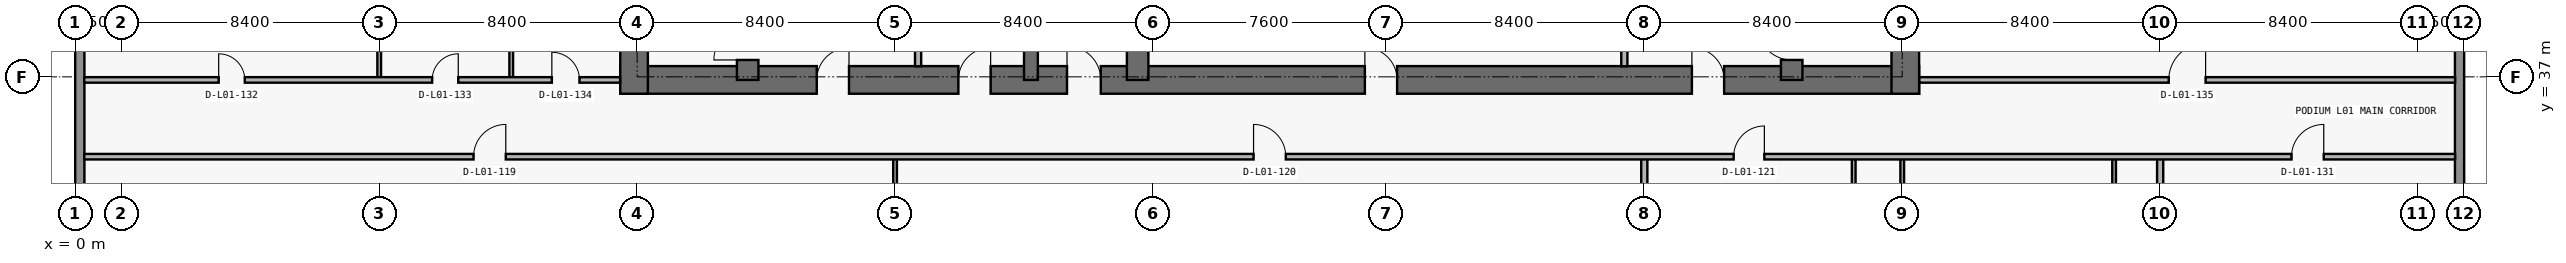
"""IFC4 building model, lengths in metres.
Left out: names, types, materials, properties, quantities, classifications, styles, units other than length and angle.
Written with IfcOpenShell. Run it as: python <this file> out.ifc"""

import sys

from ifc_helpers import new_model, si_unit, direction, frame, frame_2d, origin, place, context, subcontext, project, spatial, rectangle, extrude, element, fill, save


model = new_model("IFC4")
c1 = context("Model", 3, precision=1e-05, world=origin(), true_north=direction((0.0, 1.0)))
c2 = subcontext(c1, "Body", "Model", "MODEL_VIEW")
j1 = project(units=[si_unit("LENGTHUNIT", "METRE"), si_unit("PLANEANGLEUNIT", "RADIAN")], contexts=[c1])
p1 = place(None, origin())
s1 = spatial("IfcSite", under=j1, at=p1, CompositionType="ELEMENT")
p2 = place(p1, origin())
s2 = spatial("IfcBuilding", under=s1, at=p2, CompositionType="ELEMENT")
p3 = place(p2, frame((0.0, 0.0, 5.4)))
s3 = spatial("IfcBuildingStorey", under=s2, at=p3, CompositionType="ELEMENT", Elevation=5.4)
p4 = place(p3, frame((17.75, 36.9, 0.0), z_axis=(0.0, 0.0, 1.0), x_axis=(1.0, 0.0, 0.0)))
e1 = element("IfcWall", 1, at=p4, inside=s3, PredefinedType="SHEAR", context=c2, shape_type="SweptSolid", body=[
    extrude(rectangle(XDim=42.3, YDim=0.9, at=frame_2d((21.15, 0.0))), origin(), (0.0, 0.0, 1.0), 4.5),
])
p5 = place(p4, frame((14.55, 0.0, 0.0)))
e2 = element("IfcOpeningElement", 2, at=p5, cuts=e1, PredefinedType="OPENING", context=c2, shape_type="SweptSolid", body=[
    extrude(rectangle(XDim=1.1, YDim=2.15, at=frame_2d((0.55, 1.075))), frame((0.0, 0.46, 0.0), z_axis=(0.0, -1.0, 0.0), x_axis=(1.0, 0.0, 0.0)), (0.0, 0.0, 1.0), 0.92),
])
p6 = place(p4, frame((6.4, 0.0, 0.0)))
e3 = element("IfcOpeningElement", 3, at=p6, cuts=e1, PredefinedType="OPENING", context=c2, shape_type="SweptSolid", body=[
    extrude(rectangle(XDim=1.05, YDim=2.15, at=frame_2d((0.525, 1.075))), frame((0.0, 0.46, 0.0), z_axis=(0.0, -1.0, 0.0), x_axis=(1.0, 0.0, 0.0)), (0.0, 0.0, 1.0), 0.92),
])
p7 = place(p4, frame((34.9, 0.0, 0.0)))
e4 = element("IfcOpeningElement", 4, at=p7, cuts=e1, PredefinedType="OPENING", context=c2, shape_type="SweptSolid", body=[
    extrude(rectangle(XDim=1.05, YDim=2.15, at=frame_2d((0.525, 1.075))), frame((0.0, 0.46, 0.0), z_axis=(0.0, -1.0, 0.0), x_axis=(1.0, 0.0, 0.0)), (0.0, 0.0, 1.0), 0.92),
])
p8 = place(p4, frame((11.012, 0.0, 0.0)))
e5 = element("IfcOpeningElement", 5, at=p8, cuts=e1, PredefinedType="OPENING", context=c2, shape_type="SweptSolid", body=[
    extrude(rectangle(XDim=1.05, YDim=2.15, at=frame_2d((0.525, 1.075))), frame((0.0, 0.46, 0.0), z_axis=(0.0, -1.0, 0.0), x_axis=(1.0, 0.0, 0.0)), (0.0, 0.0, 1.0), 0.92),
])
p9 = place(p4, frame((24.25, 0.0, 0.0)))
e6 = element("IfcOpeningElement", 6, at=p9, cuts=e1, PredefinedType="OPENING", context=c2, shape_type="SweptSolid", body=[
    extrude(rectangle(XDim=1.05, YDim=2.15, at=frame_2d((0.525, 1.075))), frame((0.0, 0.46, 0.0), z_axis=(0.0, -1.0, 0.0), x_axis=(1.0, 0.0, 0.0)), (0.0, 0.0, 1.0), 0.92),
])
for number, where, z_axis, x_axis in (
    (7, (18.2, 36.45, 0.0), (0.0, 0.0, 1.0), (0.0, 1.0, 0.0)),
    (8, (59.6, 36.45, 0.0), (0.0, 0.0, 1.0), (0.0, 1.0, 0.0)),
):
    element("IfcWall", number, at=place(p3, frame(where, z_axis=z_axis, x_axis=x_axis)), inside=s3, PredefinedType="SHEAR", context=c2, shape_type="SweptSolid", body=[
        extrude(rectangle(XDim=14.15, YDim=0.9, at=frame_2d((7.075, 0.0))), origin(), (0.0, 0.0, 1.0), 4.5),
    ])
p10 = place(p3, frame((21.9, 36.9, 0.0), z_axis=(0.0, 0.0, 1.0), x_axis=(0.0, 1.0, 0.0)))
e9 = element("IfcWall", 9, at=p10, inside=s3, PredefinedType="SHEAR", context=c2, shape_type="SweptSolid", body=[
    extrude(rectangle(XDim=9.675, YDim=0.7, at=frame_2d((4.837, 0.0))), origin(), (0.0, 0.0, 1.0), 4.5),
])
p11 = place(p10, frame((0.65, 0.0, 0.0)))
e10 = element("IfcOpeningElement", 10, at=p11, cuts=e9, PredefinedType="OPENING", context=c2, shape_type="SweptSolid", body=[
    extrude(rectangle(XDim=1.1, YDim=2.15, at=frame_2d((0.55, 1.075))), frame((0.0, 0.36, 0.0), z_axis=(0.0, -1.0, 0.0), x_axis=(1.0, 0.0, 0.0)), (0.0, 0.0, 1.0), 0.72),
])
p12 = place(p3, frame((55.9, 36.9, 0.0), z_axis=(0.0, 0.0, 1.0), x_axis=(0.0, 1.0, 0.0)))
e11 = element("IfcWall", 11, at=p12, inside=s3, PredefinedType="SHEAR", context=c2, shape_type="SweptSolid", body=[
    extrude(rectangle(XDim=9.675, YDim=0.7, at=frame_2d((4.837, 0.0))), origin(), (0.0, 0.0, 1.0), 4.5),
])
p13 = place(p12, frame((0.65, 0.0, 0.0)))
e12 = element("IfcOpeningElement", 12, at=p13, cuts=e11, PredefinedType="OPENING", context=c2, shape_type="SweptSolid", body=[
    extrude(rectangle(XDim=1.1, YDim=2.15, at=frame_2d((0.55, 1.075))), frame((0.0, 0.36, 0.0), z_axis=(0.0, -1.0, 0.0), x_axis=(1.0, 0.0, 0.0)), (0.0, 0.0, 1.0), 0.72),
])
p14 = place(p3, frame((31.125, 36.9, 0.0), z_axis=(0.0, 0.0, 1.0), x_axis=(0.0, 1.0, 0.0)))
e13 = element("IfcWall", 13, at=p14, inside=s3, PredefinedType="SHEAR", context=c2, shape_type="SweptSolid", body=[
    extrude(rectangle(XDim=9.675, YDim=0.45, at=frame_2d((4.837, 0.0))), origin(), (0.0, 0.0, 1.0), 4.5),
])
p15 = place(p3, frame((34.6, 36.9, 0.0), z_axis=(0.0, 0.0, 1.0), x_axis=(0.0, 1.0, 0.0)))
e14 = element("IfcWall", 14, at=p15, inside=s3, PredefinedType="SHEAR", context=c2, shape_type="SweptSolid", body=[
    extrude(rectangle(XDim=9.675, YDim=0.7, at=frame_2d((4.837, 0.0))), origin(), (0.0, 0.0, 1.0), 4.5),
])
for number, where, z_axis, x_axis in (
    (15, (0.15, 26.9, 0.0), (0.0, 0.0, 1.0), (0.0, 1.0, 0.0)),
    (16, (77.65, 53.8, 0.0), (0.0, 0.0, 1.0), (0.0, -1.0, 0.0)),
):
    element("IfcWall", number, at=place(p3, frame(where, z_axis=z_axis, x_axis=x_axis)), inside=s3, PredefinedType="STANDARD", context=c2, shape_type="SweptSolid", body=[
        extrude(rectangle(XDim=26.9, YDim=0.3, at=frame_2d((13.45, 0.0))), origin(), (0.0, 0.0, 1.0), 4.5),
    ])
p16 = place(p3, frame((9.9, 36.9, 0.0), z_axis=(0.0, 0.0, 1.0), x_axis=(0.0, 1.0, 0.0)))
e17 = element("IfcWall", 17, at=p16, inside=s3, PredefinedType="PARTITIONING", context=c2, shape_type="SweptSolid", body=[
    extrude(rectangle(XDim=6.9, YDim=0.12, at=frame_2d((3.45, 0.0))), origin(), (0.0, 0.0, 1.0), 3.464),
])
p17 = place(p3, frame((14.2, 36.9, 0.0), z_axis=(0.0, 0.0, 1.0), x_axis=(0.0, 1.0, 0.0)))
e18 = element("IfcWall", 18, at=p17, inside=s3, PredefinedType="PARTITIONING", context=c2, shape_type="SweptSolid", body=[
    extrude(rectangle(XDim=6.9, YDim=0.12, at=frame_2d((3.45, 0.0))), origin(), (0.0, 0.0, 1.0), 4.5),
])
p18 = place(p3, frame((26.7, 0.295, 0.0), z_axis=(0.0, 0.0, 1.0), x_axis=(0.0, 1.0, 0.0)))
e19 = element("IfcWall", 19, at=p18, inside=s3, PredefinedType="PARTITIONING", context=c2, shape_type="SweptSolid", body=[
    extrude(rectangle(XDim=34.105, YDim=0.12, at=frame_2d((17.052, 0.0))), origin(), (0.0, 0.0, 1.0), 3.464),
])
for number, where, z_axis, x_axis in (
    (20, (27.45, 37.345, 0.0), (0.0, 0.0, 1.0), (0.0, 1.0, 0.0)),
    (21, (50.45, 37.345, 0.0), (0.0, 0.0, 1.0), (0.0, 1.0, 0.0)),
):
    element("IfcWall", number, at=place(p3, frame(where, z_axis=z_axis, x_axis=x_axis)), inside=s3, PredefinedType="PARTITIONING", context=c2, shape_type="SweptSolid", body=[
        extrude(rectangle(XDim=5.385, YDim=0.2, at=frame_2d((2.692, 0.0))), origin(), (0.0, 0.0, 1.0), 4.5),
    ])
p19 = place(p3, frame((51.1, 0.295, 0.0), z_axis=(0.0, 0.0, 1.0), x_axis=(0.0, 1.0, 0.0)))
e22 = element("IfcWall", 22, at=p19, inside=s3, PredefinedType="PARTITIONING", context=c2, shape_type="SweptSolid", body=[
    extrude(rectangle(XDim=34.105, YDim=0.2, at=frame_2d((17.052, 0.0))), origin(), (0.0, 0.0, 1.0), 3.464),
])
p20 = place(p3, frame((57.92, 27.88, 0.0), z_axis=(0.0, 0.0, 1.0), x_axis=(0.0, 1.0, 0.0)))
e23 = element("IfcWall", 23, at=p20, inside=s3, PredefinedType="PARTITIONING", context=c2, shape_type="SweptSolid", body=[
    extrude(rectangle(XDim=6.52, YDim=0.12, at=frame_2d((3.26, 0.0))), origin(), (0.0, 0.0, 1.0), 3.873),
])
p21 = place(p20, frame((2.835, 0.0, 0.0)))
e24 = element("IfcOpeningElement", 24, at=p21, cuts=e23, PredefinedType="OPENING", context=c2, shape_type="SweptSolid", body=[
    extrude(rectangle(XDim=0.85, YDim=2.1, at=frame_2d((0.425, 1.05))), frame((0.0, 0.07, 0.0), z_axis=(0.0, -1.0, 0.0), x_axis=(1.0, 0.0, 0.0)), (0.0, 0.0, 1.0), 0.14),
])
p22 = place(p3, frame((59.5, 0.295, 0.0), z_axis=(0.0, 0.0, 1.0), x_axis=(0.0, 1.0, 0.0)))
e25 = element("IfcWall", 25, at=p22, inside=s3, PredefinedType="PARTITIONING", context=c2, shape_type="SweptSolid", body=[
    extrude(rectangle(XDim=34.105, YDim=0.12, at=frame_2d((17.052, 0.0))), origin(), (0.0, 0.0, 1.0), 4.5),
])
p23 = place(p22, frame((24.735, 0.0, 0.0)))
e26 = element("IfcOpeningElement", 26, at=p23, cuts=e25, PredefinedType="OPENING", context=c2, shape_type="SweptSolid", body=[
    extrude(rectangle(XDim=0.9, YDim=2.15, at=frame_2d((0.45, 1.075))), frame((0.0, 0.07, 0.0), z_axis=(0.0, -1.0, 0.0), x_axis=(1.0, 0.0, 0.0)), (0.0, 0.0, 1.0), 0.14),
])
p24 = place(p3, frame((66.4, 27.68, 0.0), z_axis=(0.0, 0.0, 1.0), x_axis=(0.0, 1.0, 0.0)))
e27 = element("IfcWall", 27, at=p24, inside=s3, PredefinedType="PARTITIONING", context=c2, shape_type="SweptSolid", body=[
    extrude(rectangle(XDim=6.72, YDim=0.12, at=frame_2d((3.36, 0.0))), origin(), (0.0, 0.0, 1.0), 4.5),
])
p25 = place(p24, frame((2.935, 0.0, 0.0)))
e28 = element("IfcOpeningElement", 28, at=p25, cuts=e27, PredefinedType="OPENING", context=c2, shape_type="SweptSolid", body=[
    extrude(rectangle(XDim=0.85, YDim=2.1, at=frame_2d((0.425, 1.05))), frame((0.0, 0.07, 0.0), z_axis=(0.0, -1.0, 0.0), x_axis=(1.0, 0.0, 0.0)), (0.0, 0.0, 1.0), 0.14),
])
p26 = place(p3, frame((67.9, 0.295, 0.0), z_axis=(0.0, 0.0, 1.0), x_axis=(0.0, 1.0, 0.0)))
e29 = element("IfcWall", 29, at=p26, inside=s3, PredefinedType="PARTITIONING", context=c2, shape_type="SweptSolid", body=[
    extrude(rectangle(XDim=34.105, YDim=0.2, at=frame_2d((17.052, 0.0))), origin(), (0.0, 0.0, 1.0), 3.464),
])
p27 = place(p3, frame((0.295, 34.4, 0.0), z_axis=(0.0, 0.0, 1.0), x_axis=(1.0, 0.0, 0.0)))
e30 = element("IfcWall", 30, at=p27, inside=s3, PredefinedType="PARTITIONING", context=c2, shape_type="SweptSolid", body=[
    extrude(rectangle(XDim=77.21, YDim=0.18, at=frame_2d((38.605, 0.0))), origin(), (0.0, 0.0, 1.0), 4.5),
])
p28 = place(p27, frame((12.677, 0.0, 0.0)))
e31 = element("IfcOpeningElement", 31, at=p28, cuts=e30, PredefinedType="OPENING", context=c2, shape_type="SweptSolid", body=[
    extrude(rectangle(XDim=1.05, YDim=2.15, at=frame_2d((0.525, 1.075))), frame((0.0, 0.1, 0.0), z_axis=(0.0, -1.0, 0.0), x_axis=(1.0, 0.0, 0.0)), (0.0, 0.0, 1.0), 0.2),
])
p29 = place(p27, frame((38.08, 0.0, 0.0)))
e32 = element("IfcOpeningElement", 32, at=p29, cuts=e30, PredefinedType="OPENING", context=c2, shape_type="SweptSolid", body=[
    extrude(rectangle(XDim=1.05, YDim=2.15, at=frame_2d((0.525, 1.075))), frame((0.0, 0.1, 0.0), z_axis=(0.0, -1.0, 0.0), x_axis=(1.0, 0.0, 0.0)), (0.0, 0.0, 1.0), 0.2),
])
p30 = place(p27, frame((53.715, 0.0, 0.0)))
e33 = element("IfcOpeningElement", 33, at=p30, cuts=e30, PredefinedType="OPENING", context=c2, shape_type="SweptSolid", body=[
    extrude(rectangle(XDim=1.0, YDim=2.2, at=frame_2d((0.5, 1.1))), frame((0.0, 0.1, 0.0), z_axis=(0.0, -1.0, 0.0), x_axis=(1.0, 0.0, 0.0)), (0.0, 0.0, 1.0), 0.2),
])
p31 = place(p27, frame((71.883, 0.0, 0.0)))
e34 = element("IfcOpeningElement", 34, at=p31, cuts=e30, PredefinedType="OPENING", context=c2, shape_type="SweptSolid", body=[
    extrude(rectangle(XDim=1.05, YDim=2.15, at=frame_2d((0.525, 1.075))), frame((0.0, 0.1, 0.0), z_axis=(0.0, -1.0, 0.0), x_axis=(1.0, 0.0, 0.0)), (0.0, 0.0, 1.0), 0.2),
])
p32 = place(p3, frame((0.295, 36.9, 0.0), z_axis=(0.0, 0.0, 1.0), x_axis=(1.0, 0.0, 0.0)))
e35 = element("IfcWall", 35, at=p32, inside=s3, PredefinedType="PARTITIONING", context=c2, shape_type="SweptSolid", body=[
    extrude(rectangle(XDim=17.45, YDim=0.18, at=frame_2d((8.725, 0.0))), origin(), (0.0, 0.0, 1.0), 4.5),
])
p33 = place(p32, frame((4.377, 0.0, 0.0)))
e36 = element("IfcOpeningElement", 36, at=p33, cuts=e35, PredefinedType="OPENING", context=c2, shape_type="SweptSolid", body=[
    extrude(rectangle(XDim=0.85, YDim=2.1, at=frame_2d((0.425, 1.05))), frame((0.0, 0.1, 0.0), z_axis=(0.0, -1.0, 0.0), x_axis=(1.0, 0.0, 0.0)), (0.0, 0.0, 1.0), 0.2),
])
p34 = place(p32, frame((11.33, 0.0, 0.0)))
e37 = element("IfcOpeningElement", 37, at=p34, cuts=e35, PredefinedType="OPENING", context=c2, shape_type="SweptSolid", body=[
    extrude(rectangle(XDim=0.85, YDim=2.1, at=frame_2d((0.425, 1.05))), frame((0.0, 0.1, 0.0), z_axis=(0.0, -1.0, 0.0), x_axis=(1.0, 0.0, 0.0)), (0.0, 0.0, 1.0), 0.2),
])
p35 = place(p32, frame((15.228, 0.0, 0.0)))
e38 = element("IfcOpeningElement", 38, at=p35, cuts=e35, PredefinedType="OPENING", context=c2, shape_type="SweptSolid", body=[
    extrude(rectangle(XDim=0.9, YDim=2.15, at=frame_2d((0.45, 1.075))), frame((0.0, 0.1, 0.0), z_axis=(0.0, -1.0, 0.0), x_axis=(1.0, 0.0, 0.0)), (0.0, 0.0, 1.0), 0.2),
])
p36 = place(p3, frame((60.055, 36.9, 0.0), z_axis=(0.0, 0.0, 1.0), x_axis=(1.0, 0.0, 0.0)))
e39 = element("IfcWall", 39, at=p36, inside=s3, PredefinedType="PARTITIONING", context=c2, shape_type="SweptSolid", body=[
    extrude(rectangle(XDim=17.45, YDim=0.18, at=frame_2d((8.725, 0.0))), origin(), (0.0, 0.0, 1.0), 4.5),
])
p37 = place(p36, frame((8.125, 0.0, 0.0)))
e40 = element("IfcOpeningElement", 40, at=p37, cuts=e39, PredefinedType="OPENING", context=c2, shape_type="SweptSolid", body=[
    extrude(rectangle(XDim=1.2, YDim=2.2, at=frame_2d((0.6, 1.1))), frame((0.0, 0.1, 0.0), z_axis=(0.0, -1.0, 0.0), x_axis=(1.0, 0.0, 0.0)), (0.0, 0.0, 1.0), 0.2),
])
p38 = place(p5, origin())
e41 = element("IfcDoor", 41, at=p38, inside=s3, OperationType="SINGLE_SWING_LEFT", PredefinedType="DOOR", context=c2, shape_type="SweptSolid", body=[
    extrude(rectangle(XDim=1.1, YDim=2.15, at=frame_2d((0.55, 1.075))), frame((0.0, 0.025, 0.0), z_axis=(0.0, -1.0, 0.0), x_axis=(1.0, 0.0, 0.0)), (0.0, 0.0, 1.0), 0.05),
])
fill(e2, e41)
p39 = place(p6, origin())
e42 = element("IfcDoor", 42, at=p39, inside=s3, OperationType="SINGLE_SWING_RIGHT", PredefinedType="DOOR", context=c2, shape_type="SweptSolid", body=[
    extrude(rectangle(XDim=1.05, YDim=2.15, at=frame_2d((0.525, 1.075))), frame((0.0, 0.025, 0.0), z_axis=(0.0, -1.0, 0.0), x_axis=(1.0, 0.0, 0.0)), (0.0, 0.0, 1.0), 0.05),
])
fill(e3, e42)
p40 = place(p11, origin())
e43 = element("IfcDoor", 43, at=p40, inside=s3, OperationType="SINGLE_SWING_LEFT", PredefinedType="DOOR", context=c2, shape_type="SweptSolid", body=[
    extrude(rectangle(XDim=1.1, YDim=2.15, at=frame_2d((0.55, 1.075))), frame((0.0, 0.025, 0.0), z_axis=(0.0, -1.0, 0.0), x_axis=(1.0, 0.0, 0.0)), (0.0, 0.0, 1.0), 0.05),
])
fill(e10, e43)
p41 = place(p7, origin())
e44 = element("IfcDoor", 44, at=p41, inside=s3, OperationType="SINGLE_SWING_LEFT", PredefinedType="DOOR", context=c2, shape_type="SweptSolid", body=[
    extrude(rectangle(XDim=1.05, YDim=2.15, at=frame_2d((0.525, 1.075))), frame((0.0, 0.025, 0.0), z_axis=(0.0, -1.0, 0.0), x_axis=(1.0, 0.0, 0.0)), (0.0, 0.0, 1.0), 0.05),
])
fill(e4, e44)
p42 = place(p13, origin())
e45 = element("IfcDoor", 45, at=p42, inside=s3, OperationType="SINGLE_SWING_RIGHT", PredefinedType="DOOR", context=c2, shape_type="SweptSolid", body=[
    extrude(rectangle(XDim=1.1, YDim=2.15, at=frame_2d((0.55, 1.075))), frame((0.0, 0.025, 0.0), z_axis=(0.0, -1.0, 0.0), x_axis=(1.0, 0.0, 0.0)), (0.0, 0.0, 1.0), 0.05),
])
fill(e12, e45)
p43 = place(p8, origin())
e46 = element("IfcDoor", 46, at=p43, inside=s3, OperationType="SINGLE_SWING_RIGHT", PredefinedType="DOOR", context=c2, shape_type="SweptSolid", body=[
    extrude(rectangle(XDim=1.05, YDim=2.15, at=frame_2d((0.525, 1.075))), frame((0.0, 0.025, 0.0), z_axis=(0.0, -1.0, 0.0), x_axis=(1.0, 0.0, 0.0)), (0.0, 0.0, 1.0), 0.05),
])
fill(e5, e46)
p44 = place(p9, origin())
e47 = element("IfcDoor", 47, at=p44, inside=s3, OperationType="SINGLE_SWING_LEFT", PredefinedType="DOOR", context=c2, shape_type="SweptSolid", body=[
    extrude(rectangle(XDim=1.05, YDim=2.15, at=frame_2d((0.525, 1.075))), frame((0.0, 0.025, 0.0), z_axis=(0.0, -1.0, 0.0), x_axis=(1.0, 0.0, 0.0)), (0.0, 0.0, 1.0), 0.05),
])
fill(e6, e47)
p45 = place(p28, origin())
e48 = element("IfcDoor", 48, at=p45, inside=s3, OperationType="SINGLE_SWING_RIGHT", PredefinedType="DOOR", context=c2, shape_type="SweptSolid", body=[
    extrude(rectangle(XDim=1.05, YDim=2.15, at=frame_2d((0.525, 1.075))), frame((0.0, 0.025, 0.0), z_axis=(0.0, -1.0, 0.0), x_axis=(1.0, 0.0, 0.0)), (0.0, 0.0, 1.0), 0.05),
])
fill(e31, e48)
p46 = place(p29, origin())
e49 = element("IfcDoor", 49, at=p46, inside=s3, OperationType="SINGLE_SWING_LEFT", PredefinedType="DOOR", context=c2, shape_type="SweptSolid", body=[
    extrude(rectangle(XDim=1.05, YDim=2.15, at=frame_2d((0.525, 1.075))), frame((0.0, 0.025, 0.0), z_axis=(0.0, -1.0, 0.0), x_axis=(1.0, 0.0, 0.0)), (0.0, 0.0, 1.0), 0.05),
])
fill(e32, e49)
p47 = place(p30, origin())
e50 = element("IfcDoor", 50, at=p47, inside=s3, OperationType="SINGLE_SWING_RIGHT", PredefinedType="DOOR", context=c2, shape_type="SweptSolid", body=[
    extrude(rectangle(XDim=1.0, YDim=2.2, at=frame_2d((0.5, 1.1))), frame((0.0, 0.025, 0.0), z_axis=(0.0, -1.0, 0.0), x_axis=(1.0, 0.0, 0.0)), (0.0, 0.0, 1.0), 0.05),
])
fill(e33, e50)
p48 = place(p31, origin())
e51 = element("IfcDoor", 51, at=p48, inside=s3, OperationType="SINGLE_SWING_RIGHT", PredefinedType="DOOR", context=c2, shape_type="SweptSolid", body=[
    extrude(rectangle(XDim=1.05, YDim=2.15, at=frame_2d((0.525, 1.075))), frame((0.0, 0.025, 0.0), z_axis=(0.0, -1.0, 0.0), x_axis=(1.0, 0.0, 0.0)), (0.0, 0.0, 1.0), 0.05),
])
fill(e34, e51)
p49 = place(p33, origin())
e52 = element("IfcDoor", 52, at=p49, inside=s3, OperationType="SINGLE_SWING_LEFT", PredefinedType="DOOR", context=c2, shape_type="SweptSolid", body=[
    extrude(rectangle(XDim=0.85, YDim=2.1, at=frame_2d((0.425, 1.05))), frame((0.0, 0.025, 0.0), z_axis=(0.0, -1.0, 0.0), x_axis=(1.0, 0.0, 0.0)), (0.0, 0.0, 1.0), 0.05),
])
fill(e36, e52)
p50 = place(p34, origin())
e53 = element("IfcDoor", 53, at=p50, inside=s3, OperationType="SINGLE_SWING_RIGHT", PredefinedType="DOOR", context=c2, shape_type="SweptSolid", body=[
    extrude(rectangle(XDim=0.85, YDim=2.1, at=frame_2d((0.425, 1.05))), frame((0.0, 0.025, 0.0), z_axis=(0.0, -1.0, 0.0), x_axis=(1.0, 0.0, 0.0)), (0.0, 0.0, 1.0), 0.05),
])
fill(e37, e53)
p51 = place(p35, origin())
e54 = element("IfcDoor", 54, at=p51, inside=s3, OperationType="SINGLE_SWING_LEFT", PredefinedType="DOOR", context=c2, shape_type="SweptSolid", body=[
    extrude(rectangle(XDim=0.9, YDim=2.15, at=frame_2d((0.45, 1.075))), frame((0.0, 0.025, 0.0), z_axis=(0.0, -1.0, 0.0), x_axis=(1.0, 0.0, 0.0)), (0.0, 0.0, 1.0), 0.05),
])
fill(e38, e54)
p52 = place(p37, origin())
e55 = element("IfcDoor", 55, at=p52, inside=s3, OperationType="SINGLE_SWING_RIGHT", PredefinedType="DOOR", context=c2, shape_type="SweptSolid", body=[
    extrude(rectangle(XDim=1.2, YDim=2.2, at=frame_2d((0.6, 1.1))), frame((0.0, 0.025, 0.0), z_axis=(0.0, -1.0, 0.0), x_axis=(1.0, 0.0, 0.0)), (0.0, 0.0, 1.0), 0.05),
])
fill(e40, e55)
save(model, sys.argv[1])
